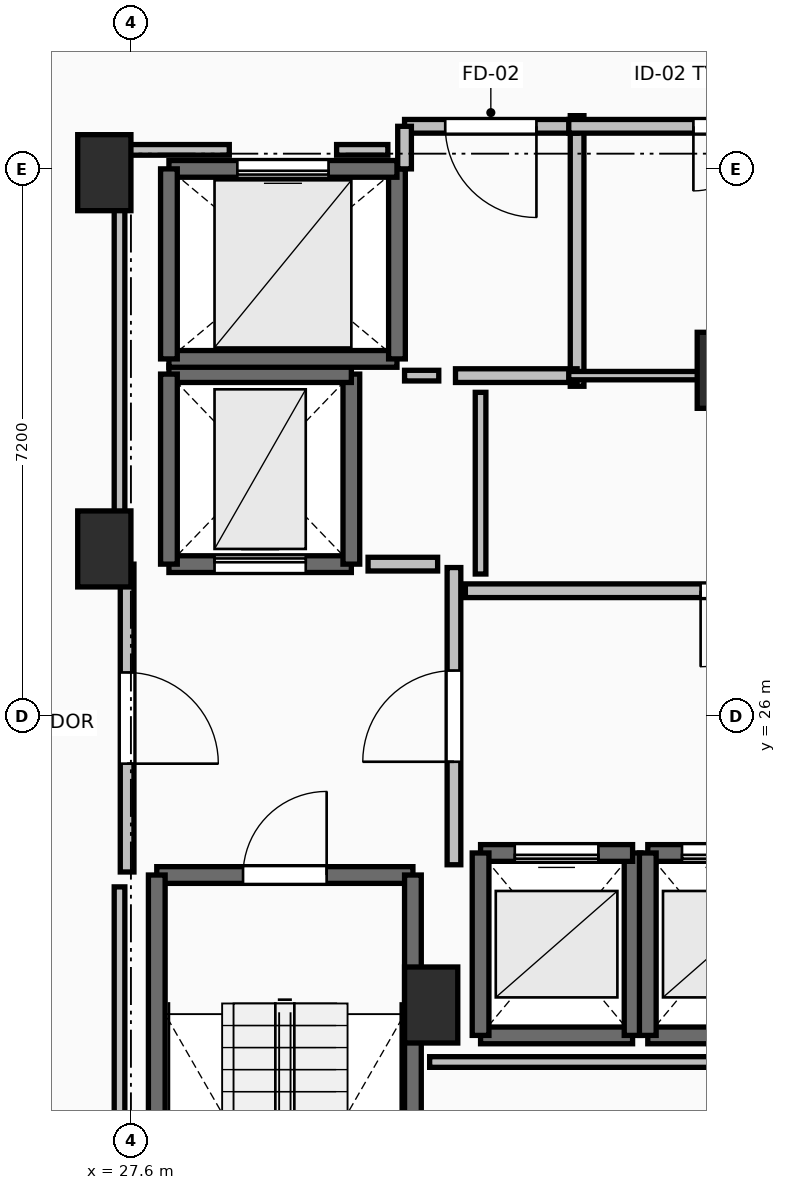
"""IFC4 building model, lengths in metres.
Left out: names, types, materials, properties, quantities, classifications, styles, units other than length and angle.
Written with IfcOpenShell. Run it as: python <this file> out.ifc"""

import sys

from ifc_helpers import new_model, si_unit, direction, frame, frame_2d, origin, origin_2d, place, context, subcontext, project, spatial, rectangle, extrude, element, fill, save


model = new_model("IFC4")
c1 = context("Model", 3, precision=1e-05, world=origin(), true_north=direction((0.0, 1.0)))
c2 = subcontext(c1, "Body", "Model", "MODEL_VIEW")
j1 = project(units=[si_unit("LENGTHUNIT", "METRE"), si_unit("PLANEANGLEUNIT", "RADIAN")], contexts=[c1])
p1 = place(None, origin())
s1 = spatial("IfcSite", under=j1, at=p1, CompositionType="ELEMENT")
p2 = place(p1, origin())
s2 = spatial("IfcBuilding", under=s1, at=p2, CompositionType="ELEMENT")
p3 = place(p2, frame((0.0, 0.0, 179.1)))
s3 = spatial("IfcBuildingStorey", under=s2, at=p3, CompositionType="ELEMENT", Elevation=179.1)
for number, where, z_axis, x_axis in (
    (1, (27.25, 28.2, 0.0), (0.0, 0.0, 1.0), (1.0, 0.0, 0.0)),
    (2, (27.25, 33.15, 0.0), (0.0, 0.0, 1.0), (1.0, 0.0, 0.0)),
    (3, (31.55, 22.2, 0.0), (0.0, 0.0, 1.0), (1.0, 0.0, 0.0)),
    (4, (35.4, 30.55, 0.0), (0.0, 0.0, 1.0), (1.0, 0.0, 0.0)),
):
    element("IfcColumn", number, at=place(p3, frame(where, z_axis=z_axis, x_axis=x_axis)), inside=s3, PredefinedType="PILASTER", context=c2, shape_type="SweptSolid", body=[
        extrude(rectangle(XDim=0.7, YDim=1.0, at=origin_2d()), origin(), (0.0, 0.0, 1.0), 3.5),
    ])
p4 = place(p3, frame((27.94, 23.91, 0.0), z_axis=(0.0, 0.0, 1.0), x_axis=(1.0, 0.0, 0.0)))
e5 = element("IfcWall", 5, at=p4, inside=s3, PredefinedType="SOLIDWALL", context=c2, shape_type="SweptSolid", body=[
    extrude(rectangle(XDim=3.37, YDim=0.22, at=frame_2d((1.685, 0.0))), origin(), (0.0, 0.0, 1.0), 3.24),
])
p5 = place(p4, frame((1.135, 0.0, 0.0)))
e6 = element("IfcOpeningElement", 6, at=p5, cuts=e5, PredefinedType="OPENING", context=c2, shape_type="SweptSolid", body=[
    extrude(rectangle(XDim=1.1, YDim=2.15, at=frame_2d((0.55, 1.075))), frame((0.0, 0.125, 0.0), z_axis=(0.0, -1.0, 0.0), x_axis=(1.0, 0.0, 0.0)), (0.0, 0.0, 1.0), 0.25),
])
for number, where, z_axis, x_axis in (
    (7, (31.31, 23.91, 0.0), (0.0, 0.0, 1.0), (0.0, -1.0, 0.0)),
    (8, (27.94, 16.49, 0.0), (0.0, 0.0, 1.0), (0.0, 1.0, 0.0)),
):
    element("IfcWall", number, at=place(p3, frame(where, z_axis=z_axis, x_axis=x_axis)), inside=s3, PredefinedType="SOLIDWALL", context=c2, shape_type="SweptSolid", body=[
        extrude(rectangle(XDim=7.42, YDim=0.22, at=frame_2d((3.71, 0.0))), origin(), (0.0, 0.0, 1.0), 3.24),
    ])
p6 = place(p3, frame((32.2, 21.8, 0.0), z_axis=(0.0, 0.0, 1.0), x_axis=(1.0, 0.0, 0.0)))
e9 = element("IfcWall", 9, at=p6, inside=s3, PredefinedType="SOLIDWALL", context=c2, shape_type="SweptSolid", body=[
    extrude(rectangle(XDim=2.0, YDim=0.22, at=frame_2d((1.0, 0.0))), origin(), (0.0, 0.0, 1.0), 3.24),
])
p7 = place(p3, frame((34.2, 21.8, 0.0), z_axis=(0.0, 0.0, 1.0), x_axis=(0.0, 1.0, 0.0)))
e10 = element("IfcWall", 10, at=p7, inside=s3, PredefinedType="SOLIDWALL", context=c2, shape_type="SweptSolid", body=[
    extrude(rectangle(XDim=2.4, YDim=0.22, at=frame_2d((1.2, 0.0))), origin(), (0.0, 0.0, 1.0), 3.24),
])
p8 = place(p3, frame((34.2, 24.2, 0.0), z_axis=(0.0, 0.0, 1.0), x_axis=(-1.0, 0.0, 0.0)))
e11 = element("IfcWall", 11, at=p8, inside=s3, PredefinedType="SOLIDWALL", context=c2, shape_type="SweptSolid", body=[
    extrude(rectangle(XDim=2.0, YDim=0.22, at=frame_2d((1.0, 0.0))), origin(), (0.0, 0.0, 1.0), 3.24),
])
p9 = place(p8, frame((0.45, 0.0, 0.0)))
e12 = element("IfcOpeningElement", 12, at=p9, cuts=e11, PredefinedType="OPENING", context=c2, shape_type="SweptSolid", body=[
    extrude(rectangle(XDim=1.1, YDim=2.2, at=frame_2d((0.55, 1.1))), frame((0.0, 0.125, 0.0), z_axis=(0.0, -1.0, 0.0), x_axis=(1.0, 0.0, 0.0)), (0.0, 0.0, 1.0), 0.25),
])
p10 = place(p3, frame((32.2, 24.2, 0.0), z_axis=(0.0, 0.0, 1.0), x_axis=(0.0, -1.0, 0.0)))
e13 = element("IfcWall", 13, at=p10, inside=s3, PredefinedType="SOLIDWALL", context=c2, shape_type="SweptSolid", body=[
    extrude(rectangle(XDim=2.4, YDim=0.22, at=frame_2d((1.2, 0.0))), origin(), (0.0, 0.0, 1.0), 3.24),
])
p11 = place(p3, frame((34.4, 21.8, 0.0), z_axis=(0.0, 0.0, 1.0), x_axis=(1.0, 0.0, 0.0)))
e14 = element("IfcWall", 14, at=p11, inside=s3, PredefinedType="SOLIDWALL", context=c2, shape_type="SweptSolid", body=[
    extrude(rectangle(XDim=2.0, YDim=0.22, at=frame_2d((1.0, 0.0))), origin(), (0.0, 0.0, 1.0), 3.24),
])
p12 = place(p3, frame((36.4, 24.2, 0.0), z_axis=(0.0, 0.0, 1.0), x_axis=(-1.0, 0.0, 0.0)))
e15 = element("IfcWall", 15, at=p12, inside=s3, PredefinedType="SOLIDWALL", context=c2, shape_type="SweptSolid", body=[
    extrude(rectangle(XDim=2.0, YDim=0.22, at=frame_2d((1.0, 0.0))), origin(), (0.0, 0.0, 1.0), 3.24),
])
p13 = place(p12, frame((0.45, 0.0, 0.0)))
e16 = element("IfcOpeningElement", 16, at=p13, cuts=e15, PredefinedType="OPENING", context=c2, shape_type="SweptSolid", body=[
    extrude(rectangle(XDim=1.1, YDim=2.2, at=frame_2d((0.55, 1.1))), frame((0.0, 0.125, 0.0), z_axis=(0.0, -1.0, 0.0), x_axis=(1.0, 0.0, 0.0)), (0.0, 0.0, 1.0), 0.25),
])
p14 = place(p3, frame((34.4, 24.2, 0.0), z_axis=(0.0, 0.0, 1.0), x_axis=(0.0, -1.0, 0.0)))
e17 = element("IfcWall", 17, at=p14, inside=s3, PredefinedType="SOLIDWALL", context=c2, shape_type="SweptSolid", body=[
    extrude(rectangle(XDim=2.4, YDim=0.22, at=frame_2d((1.2, 0.0))), origin(), (0.0, 0.0, 1.0), 3.24),
])
p15 = place(p3, frame((28.1, 28.0, 0.0), z_axis=(0.0, 0.0, 1.0), x_axis=(1.0, 0.0, 0.0)))
e18 = element("IfcWall", 18, at=p15, inside=s3, PredefinedType="SHEAR", context=c2, shape_type="SweptSolid", body=[
    extrude(rectangle(XDim=2.4, YDim=0.22, at=frame_2d((1.2, 0.0))), origin(), (0.0, 0.0, 1.0), 3.24),
])
p16 = place(p15, frame((0.6, 0.0, 0.0)))
e19 = element("IfcOpeningElement", 19, at=p16, cuts=e18, PredefinedType="OPENING", context=c2, shape_type="SweptSolid", body=[
    extrude(rectangle(XDim=1.2, YDim=2.2, at=frame_2d((0.6, 1.1))), frame((0.0, 0.125, 0.0), z_axis=(0.0, -1.0, 0.0), x_axis=(1.0, 0.0, 0.0)), (0.0, 0.0, 1.0), 0.25),
])
p17 = place(p3, frame((30.5, 28.0, 0.0), z_axis=(0.0, 0.0, 1.0), x_axis=(0.0, 1.0, 0.0)))
e20 = element("IfcWall", 20, at=p17, inside=s3, PredefinedType="SHEAR", context=c2, shape_type="SweptSolid", body=[
    extrude(rectangle(XDim=2.5, YDim=0.22, at=frame_2d((1.25, 0.0))), origin(), (0.0, 0.0, 1.0), 3.24),
])
p18 = place(p3, frame((30.5, 30.5, 0.0), z_axis=(0.0, 0.0, 1.0), x_axis=(-1.0, 0.0, 0.0)))
e21 = element("IfcWall", 21, at=p18, inside=s3, PredefinedType="SHEAR", context=c2, shape_type="SweptSolid", body=[
    extrude(rectangle(XDim=2.4, YDim=0.22, at=frame_2d((1.2, 0.0))), origin(), (0.0, 0.0, 1.0), 3.24),
])
p19 = place(p3, frame((28.1, 30.5, 0.0), z_axis=(0.0, 0.0, 1.0), x_axis=(0.0, -1.0, 0.0)))
e22 = element("IfcWall", 22, at=p19, inside=s3, PredefinedType="SHEAR", context=c2, shape_type="SweptSolid", body=[
    extrude(rectangle(XDim=2.5, YDim=0.22, at=frame_2d((1.25, 0.0))), origin(), (0.0, 0.0, 1.0), 3.24),
])
p20 = place(p3, frame((28.1, 30.7, 0.0), z_axis=(0.0, 0.0, 1.0), x_axis=(1.0, 0.0, 0.0)))
e23 = element("IfcWall", 23, at=p20, inside=s3, PredefinedType="SOLIDWALL", context=c2, shape_type="SweptSolid", body=[
    extrude(rectangle(XDim=3.0, YDim=0.22, at=frame_2d((1.5, 0.0))), origin(), (0.0, 0.0, 1.0), 3.24),
])
p21 = place(p3, frame((31.1, 30.7, 0.0), z_axis=(0.0, 0.0, 1.0), x_axis=(0.0, 1.0, 0.0)))
e24 = element("IfcWall", 24, at=p21, inside=s3, PredefinedType="SOLIDWALL", context=c2, shape_type="SweptSolid", body=[
    extrude(rectangle(XDim=2.5, YDim=0.22, at=frame_2d((1.25, 0.0))), origin(), (0.0, 0.0, 1.0), 3.24),
])
p22 = place(p3, frame((31.1, 33.2, 0.0), z_axis=(0.0, 0.0, 1.0), x_axis=(-1.0, 0.0, 0.0)))
e25 = element("IfcWall", 25, at=p22, inside=s3, PredefinedType="SOLIDWALL", context=c2, shape_type="SweptSolid", body=[
    extrude(rectangle(XDim=3.0, YDim=0.22, at=frame_2d((1.5, 0.0))), origin(), (0.0, 0.0, 1.0), 3.24),
])
p23 = place(p22, frame((0.9, 0.0, 0.0)))
e26 = element("IfcOpeningElement", 26, at=p23, cuts=e25, PredefinedType="OPENING", context=c2, shape_type="SweptSolid", body=[
    extrude(rectangle(XDim=1.2, YDim=2.2, at=frame_2d((0.6, 1.1))), frame((0.0, 0.125, 0.0), z_axis=(0.0, -1.0, 0.0), x_axis=(1.0, 0.0, 0.0)), (0.0, 0.0, 1.0), 0.25),
])
p24 = place(p3, frame((28.1, 33.2, 0.0), z_axis=(0.0, 0.0, 1.0), x_axis=(0.0, -1.0, 0.0)))
e27 = element("IfcWall", 27, at=p24, inside=s3, PredefinedType="SOLIDWALL", context=c2, shape_type="SweptSolid", body=[
    extrude(rectangle(XDim=2.5, YDim=0.22, at=frame_2d((1.25, 0.0))), origin(), (0.0, 0.0, 1.0), 3.24),
])
p25 = place(p3, frame((31.85, 24.045, 0.0), z_axis=(0.0, 0.0, 1.0), x_axis=(0.0, 1.0, 0.0)))
e28 = element("IfcWall", 28, at=p25, inside=s3, PredefinedType="PARTITIONING", context=c2, shape_type="SweptSolid", body=[
    extrude(rectangle(XDim=3.91, YDim=0.18, at=frame_2d((1.955, 0.0))), origin(), (0.0, 0.0, 1.0), 3.24),
])
p26 = place(p25, frame((1.355, 0.0, 0.0)))
e29 = element("IfcOpeningElement", 29, at=p26, cuts=e28, PredefinedType="OPENING", context=c2, shape_type="SweptSolid", body=[
    extrude(rectangle(XDim=1.2, YDim=2.15, at=frame_2d((0.6, 1.075))), frame((0.0, 0.105, 0.0), z_axis=(0.0, -1.0, 0.0), x_axis=(1.0, 0.0, 0.0)), (0.0, 0.0, 1.0), 0.21),
])
p27 = place(p3, frame((27.55, 28.0, 0.0), z_axis=(0.0, 0.0, 1.0), x_axis=(0.0, -1.0, 0.0)))
e30 = element("IfcWall", 30, at=p27, inside=s3, PredefinedType="PARTITIONING", context=c2, shape_type="SweptSolid", body=[
    extrude(rectangle(XDim=4.05, YDim=0.18, at=frame_2d((2.025, 0.0))), origin(), (0.0, 0.0, 1.0), 3.24),
])
p28 = place(p27, frame((1.425, 0.0, 0.0)))
e31 = element("IfcOpeningElement", 31, at=p28, cuts=e30, PredefinedType="OPENING", context=c2, shape_type="SweptSolid", body=[
    extrude(rectangle(XDim=1.2, YDim=2.15, at=frame_2d((0.6, 1.075))), frame((0.0, 0.105, 0.0), z_axis=(0.0, -1.0, 0.0), x_axis=(1.0, 0.0, 0.0)), (0.0, 0.0, 1.0), 0.21),
])
p29 = place(p3, frame((33.47, 30.34, 0.0), z_axis=(0.0, 0.0, 1.0), x_axis=(0.0, 1.0, 0.0)))
e32 = element("IfcWall", 32, at=p29, inside=s3, PredefinedType="PARTITIONING", context=c2, shape_type="SweptSolid", body=[
    extrude(rectangle(XDim=3.56, YDim=0.18, at=frame_2d((1.78, 0.0))), origin(), (0.0, 0.0, 1.0), 3.24),
])
p30 = place(p3, frame((31.87, 30.48, 0.0), z_axis=(0.0, 0.0, 1.0), x_axis=(1.0, 0.0, 0.0)))
e33 = element("IfcWall", 33, at=p30, inside=s3, PredefinedType="PARTITIONING", context=c2, shape_type="SweptSolid", body=[
    extrude(rectangle(XDim=1.6, YDim=0.18, at=frame_2d((0.8, 0.0))), origin(), (0.0, 0.0, 1.0), 3.24),
])
p31 = place(p3, frame((33.47, 33.76, 0.0), z_axis=(0.0, 0.0, 1.0), x_axis=(-1.0, 0.0, 0.0)))
e34 = element("IfcWall", 34, at=p31, inside=s3, PredefinedType="PARTITIONING", context=c2, shape_type="SweptSolid", body=[
    extrude(rectangle(XDim=2.27, YDim=0.18, at=frame_2d((1.135, 0.0))), origin(), (0.0, 0.0, 1.0), 3.24),
])
p32 = place(p31, frame((0.535, 0.0, 0.0)))
e35 = element("IfcOpeningElement", 35, at=p32, cuts=e34, PredefinedType="OPENING", context=c2, shape_type="SweptSolid", body=[
    extrude(rectangle(XDim=1.2, YDim=2.15, at=frame_2d((0.6, 1.075))), frame((0.0, 0.105, 0.0), z_axis=(0.0, -1.0, 0.0), x_axis=(1.0, 0.0, 0.0)), (0.0, 0.0, 1.0), 0.21),
])
p33 = place(p3, frame((31.2, 33.76, 0.0), z_axis=(0.0, 0.0, 1.0), x_axis=(0.0, -1.0, 0.0)))
e36 = element("IfcWall", 36, at=p33, inside=s3, PredefinedType="PARTITIONING", context=c2, shape_type="SweptSolid", body=[
    extrude(rectangle(XDim=0.56, YDim=0.18, at=frame_2d((0.28, 0.0))), origin(), (0.0, 0.0, 1.0), 3.24),
])
p34 = place(p3, frame((39.19, 27.65, 0.0), z_axis=(0.0, 0.0, 1.0), x_axis=(-1.0, 0.0, 0.0)))
e37 = element("IfcWall", 37, at=p34, inside=s3, PredefinedType="PARTITIONING", context=c2, shape_type="SweptSolid", body=[
    extrude(rectangle(XDim=7.19, YDim=0.18, at=frame_2d((3.595, 0.0))), origin(), (0.0, 0.0, 1.0), 3.24),
])
p35 = place(p34, frame((3.095, 0.0, 0.0)))
e38 = element("IfcOpeningElement", 38, at=p35, cuts=e37, PredefinedType="OPENING", context=c2, shape_type="SweptSolid", body=[
    extrude(rectangle(XDim=1.0, YDim=2.15, at=frame_2d((0.5, 1.075))), frame((0.0, 0.105, 0.0), z_axis=(0.0, -1.0, 0.0), x_axis=(1.0, 0.0, 0.0)), (0.0, 0.0, 1.0), 0.21),
])
p36 = place(p3, frame((33.36, 30.48, 0.0), z_axis=(0.0, 0.0, 1.0), x_axis=(1.0, 0.0, 0.0)))
e39 = element("IfcWall", 39, at=p36, inside=s3, PredefinedType="PARTITIONING", context=c2, shape_type="SweptSolid", body=[
    extrude(rectangle(XDim=4.115, YDim=0.11, at=frame_2d((2.058, 0.0))), origin(), (0.0, 0.0, 1.0), 2.432),
])
p37 = place(p3, frame((37.49, 33.76, 0.0), z_axis=(0.0, 0.0, 1.0), x_axis=(-1.0, 0.0, 0.0)))
e40 = element("IfcWall", 40, at=p37, inside=s3, PredefinedType="PARTITIONING", context=c2, shape_type="SweptSolid", body=[
    extrude(rectangle(XDim=4.13, YDim=0.18, at=frame_2d((2.065, 0.0))), origin(), (0.0, 0.0, 1.0), 3.24),
])
p38 = place(p37, frame((1.64, 0.0, 0.0)))
e41 = element("IfcOpeningElement", 41, at=p38, cuts=e40, PredefinedType="OPENING", context=c2, shape_type="SweptSolid", body=[
    extrude(rectangle(XDim=0.85, YDim=2.1, at=frame_2d((0.425, 1.05))), frame((0.0, 0.105, 0.0), z_axis=(0.0, -1.0, 0.0), x_axis=(1.0, 0.0, 0.0)), (0.0, 0.0, 1.0), 0.21),
])
p39 = place(p3, frame((31.635, 28.0, 0.0), z_axis=(0.0, 0.0, 1.0), x_axis=(-1.0, 0.0, 0.0)))
e42 = element("IfcWall", 42, at=p39, inside=s3, PredefinedType="PARTITIONING", context=c2, shape_type="SweptSolid", body=[
    extrude(rectangle(XDim=0.915, YDim=0.18, at=frame_2d((0.458, 0.0))), origin(), (0.0, 0.0, 1.0), 3.24),
])
p40 = place(p3, frame((31.2, 30.48, 0.0), z_axis=(0.0, 0.0, 1.0), x_axis=(1.0, 0.0, 0.0)))
e43 = element("IfcWall", 43, at=p40, inside=s3, PredefinedType="PARTITIONING", context=c2, shape_type="SweptSolid", body=[
    extrude(rectangle(XDim=0.45, YDim=0.14, at=frame_2d((0.225, 0.0))), origin(), (0.0, 0.0, 1.0), 3.24),
])
p41 = place(p3, frame((36.439, 21.45, 0.0), z_axis=(0.0, 0.0, 1.0), x_axis=(-1.0, 0.0, 0.0)))
e44 = element("IfcWall", 44, at=p41, inside=s3, PredefinedType="PARTITIONING", context=c2, shape_type="SweptSolid", body=[
    extrude(rectangle(XDim=4.909, YDim=0.14, at=frame_2d((2.455, 0.0))), origin(), (0.0, 0.0, 1.0), 3.24),
])
p42 = place(p3, frame((32.2, 30.26, 0.0), z_axis=(0.0, 0.0, 1.0), x_axis=(0.0, -1.0, 0.0)))
e45 = element("IfcWall", 45, at=p42, inside=s3, PredefinedType="PARTITIONING", context=c2, shape_type="SweptSolid", body=[
    extrude(rectangle(XDim=2.39, YDim=0.14, at=frame_2d((1.195, 0.0))), origin(), (0.0, 0.0, 1.0), 3.24),
])
p43 = place(p3, frame((30.98, 33.45, 0.0), z_axis=(0.0, 0.0, 1.0), x_axis=(-1.0, 0.0, 0.0)))
e46 = element("IfcWall", 46, at=p43, inside=s3, PredefinedType="PARTITIONING", context=c2, shape_type="SweptSolid", body=[
    extrude(rectangle(XDim=0.674, YDim=0.14, at=frame_2d((0.337, 0.0))), origin(), (0.0, 0.0, 1.0), 3.24),
])
p44 = place(p3, frame((28.894, 33.45, 0.0), z_axis=(0.0, 0.0, 1.0), x_axis=(-1.0, 0.0, 0.0)))
e47 = element("IfcWall", 47, at=p44, inside=s3, PredefinedType="PARTITIONING", context=c2, shape_type="SweptSolid", body=[
    extrude(rectangle(XDim=1.444, YDim=0.14, at=frame_2d((0.722, 0.0))), origin(), (0.0, 0.0, 1.0), 2.432),
])
p45 = place(p3, frame((27.45, 33.45, 0.0), z_axis=(0.0, 0.0, 1.0), x_axis=(0.0, -1.0, 0.0)))
e48 = element("IfcWall", 48, at=p45, inside=s3, PredefinedType="PARTITIONING", context=c2, shape_type="SweptSolid", body=[
    extrude(rectangle(XDim=5.254, YDim=0.14, at=frame_2d((2.627, 0.0))), origin(), (0.0, 0.0, 1.0), 2.432),
])
p46 = place(p3, frame((27.45, 23.754, 0.0), z_axis=(0.0, 0.0, 1.0), x_axis=(0.0, -1.0, 0.0)))
e49 = element("IfcWall", 49, at=p46, inside=s3, PredefinedType="PARTITIONING", context=c2, shape_type="SweptSolid", body=[
    extrude(rectangle(XDim=7.514, YDim=0.14, at=frame_2d((3.757, 0.0))), origin(), (0.0, 0.0, 1.0), 2.432),
])
p47 = place(p5, origin())
e50 = element("IfcDoor", 50, at=p47, inside=s3, OperationType="SINGLE_SWING_RIGHT", PredefinedType="DOOR", context=c2, shape_type="SweptSolid", body=[
    extrude(rectangle(XDim=1.1, YDim=2.15, at=frame_2d((0.55, 1.075))), frame((0.0, 0.025, 0.0), z_axis=(0.0, -1.0, 0.0), x_axis=(1.0, 0.0, 0.0)), (0.0, 0.0, 1.0), 0.05),
])
fill(e6, e50)
p48 = place(p9, origin())
e51 = element("IfcDoor", 51, at=p48, inside=s3, OperationType="SLIDING_TO_LEFT", PredefinedType="DOOR", context=c2, shape_type="SweptSolid", body=[
    extrude(rectangle(XDim=1.1, YDim=2.2, at=frame_2d((0.55, 1.1))), frame((0.0, 0.025, 0.0), z_axis=(0.0, -1.0, 0.0), x_axis=(1.0, 0.0, 0.0)), (0.0, 0.0, 1.0), 0.05),
])
fill(e12, e51)
p49 = place(p13, origin())
e52 = element("IfcDoor", 52, at=p49, inside=s3, OperationType="SLIDING_TO_LEFT", PredefinedType="DOOR", context=c2, shape_type="SweptSolid", body=[
    extrude(rectangle(XDim=1.1, YDim=2.2, at=frame_2d((0.55, 1.1))), frame((0.0, 0.025, 0.0), z_axis=(0.0, -1.0, 0.0), x_axis=(1.0, 0.0, 0.0)), (0.0, 0.0, 1.0), 0.05),
])
fill(e16, e52)
p50 = place(p16, origin())
e53 = element("IfcDoor", 53, at=p50, inside=s3, OperationType="SLIDING_TO_LEFT", PredefinedType="DOOR", context=c2, shape_type="SweptSolid", body=[
    extrude(rectangle(XDim=1.2, YDim=2.2, at=frame_2d((0.6, 1.1))), frame((0.0, 0.025, 0.0), z_axis=(0.0, -1.0, 0.0), x_axis=(1.0, 0.0, 0.0)), (0.0, 0.0, 1.0), 0.05),
])
fill(e19, e53)
p51 = place(p23, origin())
e54 = element("IfcDoor", 54, at=p51, inside=s3, OperationType="SLIDING_TO_LEFT", PredefinedType="DOOR", context=c2, shape_type="SweptSolid", body=[
    extrude(rectangle(XDim=1.2, YDim=2.2, at=frame_2d((0.6, 1.1))), frame((0.0, 0.025, 0.0), z_axis=(0.0, -1.0, 0.0), x_axis=(1.0, 0.0, 0.0)), (0.0, 0.0, 1.0), 0.05),
])
fill(e26, e54)
p52 = place(p26, origin())
e55 = element("IfcDoor", 55, at=p52, inside=s3, OperationType="SINGLE_SWING_LEFT", PredefinedType="DOOR", context=c2, shape_type="SweptSolid", body=[
    extrude(rectangle(XDim=1.2, YDim=2.15, at=frame_2d((0.6, 1.075))), frame((0.0, 0.025, 0.0), z_axis=(0.0, -1.0, 0.0), x_axis=(1.0, 0.0, 0.0)), (0.0, 0.0, 1.0), 0.05),
])
fill(e29, e55)
p53 = place(p28, origin())
e56 = element("IfcDoor", 56, at=p53, inside=s3, OperationType="SINGLE_SWING_RIGHT", PredefinedType="DOOR", context=c2, shape_type="SweptSolid", body=[
    extrude(rectangle(XDim=1.2, YDim=2.15, at=frame_2d((0.6, 1.075))), frame((0.0, 0.025, 0.0), z_axis=(0.0, -1.0, 0.0), x_axis=(1.0, 0.0, 0.0)), (0.0, 0.0, 1.0), 0.05),
])
fill(e31, e56)
p54 = place(p32, origin())
e57 = element("IfcDoor", 57, at=p54, inside=s3, OperationType="SINGLE_SWING_LEFT", PredefinedType="DOOR", context=c2, shape_type="SweptSolid", body=[
    extrude(rectangle(XDim=1.2, YDim=2.15, at=frame_2d((0.6, 1.075))), frame((0.0, 0.025, 0.0), z_axis=(0.0, -1.0, 0.0), x_axis=(1.0, 0.0, 0.0)), (0.0, 0.0, 1.0), 0.05),
])
fill(e35, e57)
p55 = place(p35, origin())
e58 = element("IfcDoor", 58, at=p55, inside=s3, OperationType="SINGLE_SWING_RIGHT", PredefinedType="DOOR", context=c2, shape_type="SweptSolid", body=[
    extrude(rectangle(XDim=1.0, YDim=2.15, at=frame_2d((0.5, 1.075))), frame((0.0, 0.025, 0.0), z_axis=(0.0, -1.0, 0.0), x_axis=(1.0, 0.0, 0.0)), (0.0, 0.0, 1.0), 0.05),
])
fill(e38, e58)
p56 = place(p38, origin())
e59 = element("IfcDoor", 59, at=p56, inside=s3, OperationType="SINGLE_SWING_RIGHT", PredefinedType="DOOR", context=c2, shape_type="SweptSolid", body=[
    extrude(rectangle(XDim=0.85, YDim=2.1, at=frame_2d((0.425, 1.05))), frame((0.0, 0.025, 0.0), z_axis=(0.0, -1.0, 0.0), x_axis=(1.0, 0.0, 0.0)), (0.0, 0.0, 1.0), 0.05),
])
fill(e41, e59)
save(model, sys.argv[1])
